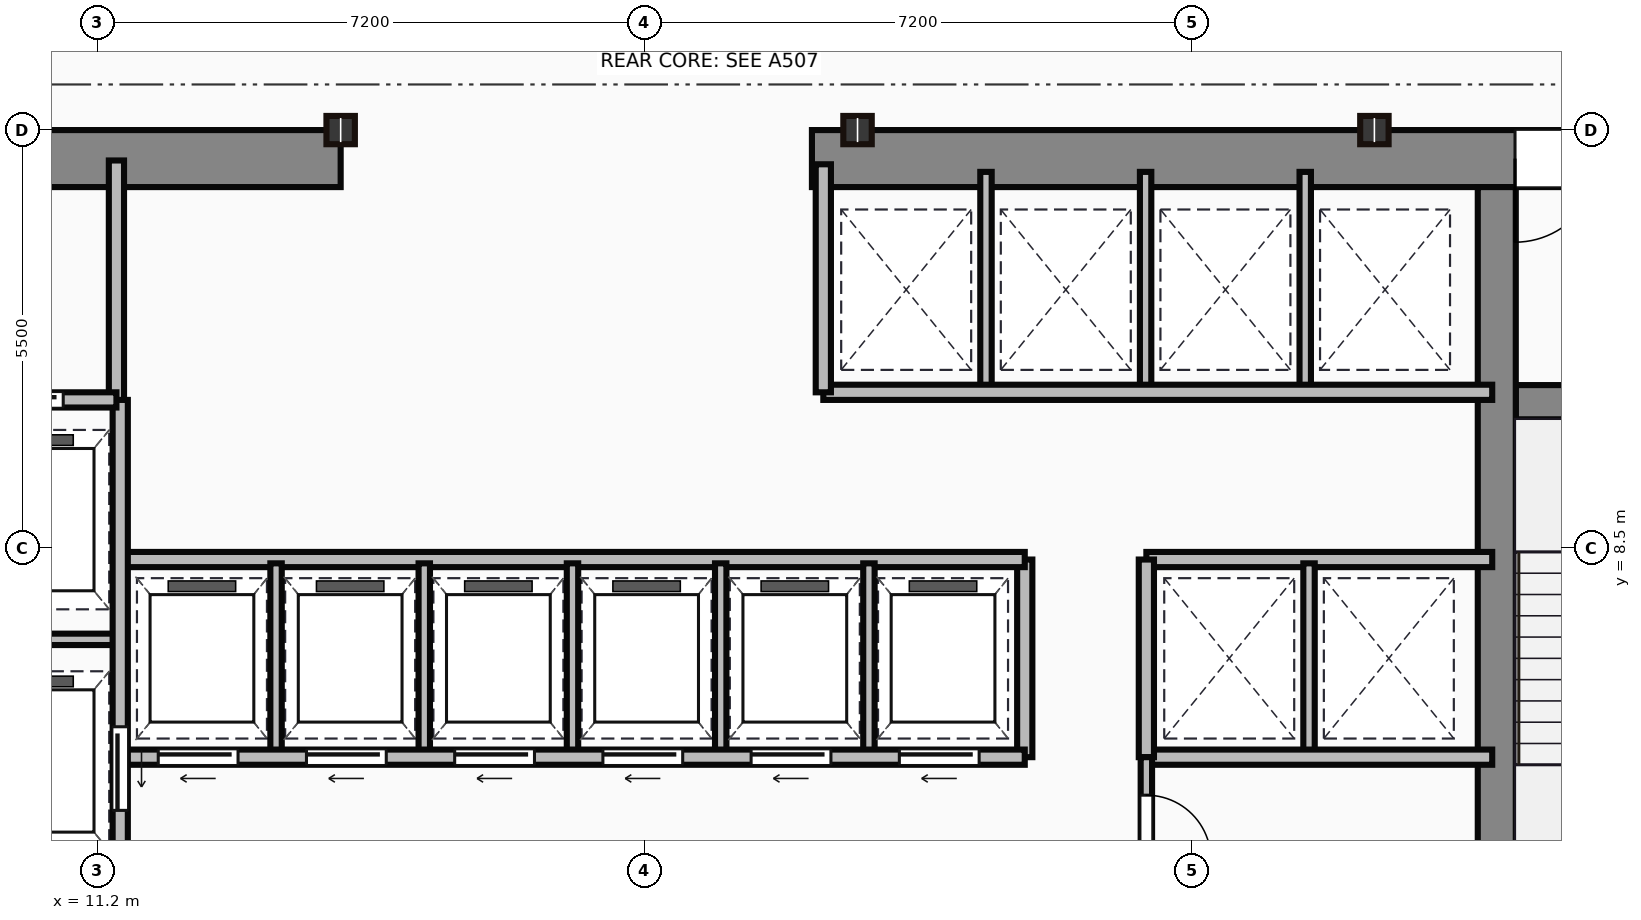
"""IFC4 building model, lengths in metres.
Left out: names, types, materials, properties, quantities, classifications, styles, units other than length and angle.
Written with IfcOpenShell. Run it as: python <this file> out.ifc"""

import sys

from ifc_helpers import new_model, si_unit, direction, frame, frame_2d, origin, origin_2d, place, context, subcontext, project, spatial, rectangle, i_section, extrude, source, transform, mapped, element, fill, save


model = new_model("IFC4")
c1 = context("Model", 3, precision=1e-05, world=origin(), true_north=direction((0.0, 1.0)))
c2 = subcontext(c1, "Body", "Model", "MODEL_VIEW")
j1 = project(units=[si_unit("LENGTHUNIT", "METRE"), si_unit("PLANEANGLEUNIT", "RADIAN")], contexts=[c1])
p1 = place(None, origin())
s1 = spatial("IfcSite", under=j1, at=p1, CompositionType="ELEMENT")
p2 = place(p1, origin())
s2 = spatial("IfcBuilding", under=s1, at=p2, CompositionType="ELEMENT")
p3 = place(p2, frame((0.0, 0.0, 166.15)))
s3 = spatial("IfcBuildingStorey", under=s2, at=p3, CompositionType="ELEMENT", Elevation=166.15)
m1 = source(origin(), c2, "Body", "SweptSolid", [
    extrude(rectangle(XDim=9.1, YDim=0.75, at=frame_2d((4.55, 0.0))), origin(), (0.0, 0.0, 1.0), 3.65),
])
p4 = place(p3, frame((5.3, 13.625, 0.0), z_axis=(0.0, 0.0, 1.0), x_axis=(1.0, 0.0, 0.0)))
e1 = element("IfcWall", 1, at=p4, inside=s3, PredefinedType="SHEAR", context=c2, shape_type="MappedRepresentation", body=[
    mapped(m1, transform((0.0, 0.0, 0.0))),
])
p5 = place(p4, frame((4.1, 0.0, 0.0)))
e2 = element("IfcOpeningElement", 2, at=p5, cuts=e1, PredefinedType="OPENING", context=c2, shape_type="SweptSolid", body=[
    extrude(rectangle(XDim=1.1, YDim=2.15, at=frame_2d((0.55, 1.075))), frame((0.0, 0.385, 0.0), z_axis=(0.0, -1.0, 0.0), x_axis=(1.0, 0.0, 0.0)), (0.0, 0.0, 1.0), 0.77),
])
m2 = source(origin(), c2, "Body", "SweptSolid", [
    extrude(rectangle(XDim=12.6, YDim=0.75, at=frame_2d((6.3, 0.0))), origin(), (0.0, 0.0, 1.0), 3.65),
])
p6 = place(p3, frame((20.6, 13.625, 0.0), z_axis=(0.0, 0.0, 1.0), x_axis=(1.0, 0.0, 0.0)))
e3 = element("IfcWall", 3, at=p6, inside=s3, PredefinedType="SHEAR", context=c2, shape_type="MappedRepresentation", body=[
    mapped(m2, transform((0.0, 0.0, 0.0))),
])
p7 = place(p6, frame((9.25, 0.0, 0.0)))
e4 = element("IfcOpeningElement", 4, at=p7, cuts=e3, PredefinedType="OPENING", context=c2, shape_type="SweptSolid", body=[
    extrude(rectangle(XDim=1.1, YDim=2.15, at=frame_2d((0.55, 1.075))), frame((0.0, 0.385, 0.0), z_axis=(0.0, -1.0, 0.0), x_axis=(1.0, 0.0, 0.0)), (0.0, 0.0, 1.0), 0.77),
])
m3 = source(origin(), c2, "Body", "SweptSolid", [
    extrude(rectangle(XDim=12.35, YDim=0.5, at=frame_2d((6.175, 0.0))), origin(), (0.0, 0.0, 1.0), 3.65),
])
p8 = place(p3, frame((29.61, 0.9, 0.0), z_axis=(0.0, 0.0, 1.0), x_axis=(0.0, 1.0, 0.0)))
e5 = element("IfcWall", 5, at=p8, inside=s3, PredefinedType="SHEAR", context=c2, shape_type="MappedRepresentation", body=[
    mapped(m3, transform((0.0, 0.0, 0.0))),
])
m4 = source(origin(), c2, "Body", "SweptSolid", [
    extrude(rectangle(XDim=3.39, YDim=0.45, at=frame_2d((1.695, 0.0))), origin(), (0.0, 0.0, 1.0), 3.65),
])
p9 = place(p3, frame((29.86, 10.42, 0.0), z_axis=(0.0, 0.0, 1.0), x_axis=(1.0, 0.0, 0.0)))
e6 = element("IfcWall", 6, at=p9, inside=s3, PredefinedType="SHEAR", context=c2, shape_type="MappedRepresentation", body=[
    mapped(m4, transform((0.0, 0.0, 0.0))),
])
p10 = place(p9, frame((1.1, 0.0, 0.0)))
e7 = element("IfcOpeningElement", 7, at=p10, cuts=e6, PredefinedType="OPENING", context=c2, shape_type="SweptSolid", body=[
    extrude(rectangle(XDim=1.1, YDim=2.15, at=frame_2d((0.55, 1.075))), frame((0.0, 0.235, 0.0), z_axis=(0.0, -1.0, 0.0), x_axis=(1.0, 0.0, 0.0)), (0.0, 0.0, 1.0), 0.47),
])
m5 = source(origin(), c2, "Body", "SweptSolid", [
    extrude(i_section(OverallWidth=0.374, OverallDepth=0.372, WebThickness=0.016, FlangeThickness=0.026, at=origin_2d()), origin(), (0.0, 0.0, 1.0), 3.65),
])
for number, where, z_axis, x_axis in (
    (8, (14.4, 14.0, 0.0), (0.0, 0.0, 1.0), (1.0, 0.0, 0.0)),
    (9, (21.2, 14.0, 0.0), (0.0, 0.0, 1.0), (1.0, 0.0, 0.0)),
    (10, (28.0, 14.0, 0.0), (0.0, 0.0, 1.0), (1.0, 0.0, 0.0)),
):
    element("IfcColumn", number, at=place(p3, frame(where, z_axis=z_axis, x_axis=x_axis)), inside=s3, PredefinedType="COLUMN", context=c2, shape_type="MappedRepresentation", body=[
        mapped(m5, transform((0.0, 0.0, 0.0))),
    ])
m6 = source(origin(), c2, "Body", "SweptSolid", [
    extrude(rectangle(XDim=3.18, YDim=0.2, at=frame_2d((1.59, 0.0))), origin(), (0.0, 0.0, 1.0), 3.4),
])
p11 = place(p3, frame((11.45, 10.42, 0.0), z_axis=(0.0, 0.0, 1.0), x_axis=(0.0, 1.0, 0.0)))
e11 = element("IfcWall", 11, at=p11, inside=s3, PredefinedType="PARTITIONING", context=c2, shape_type="MappedRepresentation", body=[
    mapped(m6, transform((0.0, 0.0, 0.0))),
])
m7 = source(origin(), c2, "Body", "SweptSolid", [
    extrude(rectangle(XDim=2.35, YDim=0.2, at=frame_2d((1.175, 0.0))), origin(), (0.0, 0.0, 1.0), 3.4),
])
p12 = place(p3, frame((9.1, 10.45, 0.0), z_axis=(0.0, 0.0, 1.0), x_axis=(1.0, 0.0, 0.0)))
e12 = element("IfcWall", 12, at=p12, inside=s3, PredefinedType="PARTITIONING", context=c2, shape_type="MappedRepresentation", body=[
    mapped(m7, transform((0.0, 0.0, 0.0))),
])
p13 = place(p12, frame((0.55, 0.0, 0.0)))
e13 = element("IfcOpeningElement", 13, at=p13, cuts=e12, PredefinedType="OPENING", context=c2, shape_type="SweptSolid", body=[
    extrude(rectangle(XDim=1.1, YDim=2.15, at=frame_2d((0.55, 1.075))), frame((0.0, 0.11, 0.0), z_axis=(0.0, -1.0, 0.0), x_axis=(1.0, 0.0, 0.0)), (0.0, 0.0, 1.0), 0.22),
])
m8 = source(origin(), c2, "Body", "SweptSolid", [
    extrude(rectangle(XDim=9.6, YDim=0.2, at=frame_2d((4.8, 0.0))), origin(), (0.0, 0.0, 1.0), 3.4),
])
p14 = place(p3, frame((11.5, 0.85, 0.0), z_axis=(0.0, 0.0, 1.0), x_axis=(0.0, 1.0, 0.0)))
e14 = element("IfcWall", 14, at=p14, inside=s3, PredefinedType="PARTITIONING", context=c2, shape_type="MappedRepresentation", body=[
    mapped(m8, transform((0.0, 0.0, 0.0))),
])
p15 = place(p14, frame((4.2, 0.0, 0.0)))
e15 = element("IfcOpeningElement", 15, at=p15, cuts=e14, PredefinedType="OPENING", context=c2, shape_type="SweptSolid", body=[
    extrude(rectangle(XDim=1.1, YDim=2.15, at=frame_2d((0.55, 1.075))), frame((0.0, 0.11, 0.0), z_axis=(0.0, -1.0, 0.0), x_axis=(1.0, 0.0, 0.0)), (0.0, 0.0, 1.0), 0.22),
])
p16 = place(p14, frame((0.9, 0.0, 0.0)))
e16 = element("IfcOpeningElement", 16, at=p16, cuts=e14, PredefinedType="OPENING", context=c2, shape_type="SweptSolid", body=[
    extrude(rectangle(XDim=1.2, YDim=2.15, at=frame_2d((0.6, 1.075))), frame((0.0, 0.11, 0.0), z_axis=(0.0, -1.0, 0.0), x_axis=(1.0, 0.0, 0.0)), (0.0, 0.0, 1.0), 0.22),
])
m9 = source(origin(), c2, "Body", "SweptSolid", [
    extrude(rectangle(XDim=2.4, YDim=0.15, at=frame_2d((1.2, 0.0))), origin(), (0.0, 0.0, 1.0), 3.4),
])
p17 = place(p3, frame((9.1, 7.3, 0.0), z_axis=(0.0, 0.0, 1.0), x_axis=(1.0, 0.0, 0.0)))
e17 = element("IfcWall", 17, at=p17, inside=s3, PredefinedType="PARTITIONING", context=c2, shape_type="MappedRepresentation", body=[
    mapped(m9, transform((0.0, 0.0, 0.0))),
])
m10 = source(origin(), c2, "Body", "SweptSolid", [
    extrude(rectangle(XDim=11.85, YDim=0.2, at=frame_2d((5.925, 0.0))), origin(), (0.0, 0.0, 1.0), 3.4),
])
p18 = place(p3, frame((11.55, 5.75, 0.0), z_axis=(0.0, 0.0, 1.0), x_axis=(1.0, 0.0, 0.0)))
e18 = element("IfcWall", 18, at=p18, inside=s3, PredefinedType="PARTITIONING", context=c2, shape_type="MappedRepresentation", body=[
    mapped(m10, transform((0.0, 0.0, 0.0))),
])
p19 = place(p18, frame((0.45, 0.0, 0.0)))
e19 = element("IfcOpeningElement", 19, at=p19, cuts=e18, PredefinedType="OPENING", context=c2, shape_type="SweptSolid", body=[
    extrude(rectangle(XDim=1.05, YDim=2.15, at=frame_2d((0.525, 1.075))), frame((0.0, 0.11, 0.0), z_axis=(0.0, -1.0, 0.0), x_axis=(1.0, 0.0, 0.0)), (0.0, 0.0, 1.0), 0.22),
])
p20 = place(p18, frame((2.4, 0.0, 0.0)))
e20 = element("IfcOpeningElement", 20, at=p20, cuts=e18, PredefinedType="OPENING", context=c2, shape_type="SweptSolid", body=[
    extrude(rectangle(XDim=1.05, YDim=2.15, at=frame_2d((0.525, 1.075))), frame((0.0, 0.11, 0.0), z_axis=(0.0, -1.0, 0.0), x_axis=(1.0, 0.0, 0.0)), (0.0, 0.0, 1.0), 0.22),
])
p21 = place(p18, frame((4.35, 0.0, 0.0)))
e21 = element("IfcOpeningElement", 21, at=p21, cuts=e18, PredefinedType="OPENING", context=c2, shape_type="SweptSolid", body=[
    extrude(rectangle(XDim=1.05, YDim=2.15, at=frame_2d((0.525, 1.075))), frame((0.0, 0.11, 0.0), z_axis=(0.0, -1.0, 0.0), x_axis=(1.0, 0.0, 0.0)), (0.0, 0.0, 1.0), 0.22),
])
p22 = place(p18, frame((6.3, 0.0, 0.0)))
e22 = element("IfcOpeningElement", 22, at=p22, cuts=e18, PredefinedType="OPENING", context=c2, shape_type="SweptSolid", body=[
    extrude(rectangle(XDim=1.05, YDim=2.15, at=frame_2d((0.525, 1.075))), frame((0.0, 0.11, 0.0), z_axis=(0.0, -1.0, 0.0), x_axis=(1.0, 0.0, 0.0)), (0.0, 0.0, 1.0), 0.22),
])
p23 = place(p18, frame((8.25, 0.0, 0.0)))
e23 = element("IfcOpeningElement", 23, at=p23, cuts=e18, PredefinedType="OPENING", context=c2, shape_type="SweptSolid", body=[
    extrude(rectangle(XDim=1.05, YDim=2.15, at=frame_2d((0.525, 1.075))), frame((0.0, 0.11, 0.0), z_axis=(0.0, -1.0, 0.0), x_axis=(1.0, 0.0, 0.0)), (0.0, 0.0, 1.0), 0.22),
])
p24 = place(p18, frame((10.2, 0.0, 0.0)))
e24 = element("IfcOpeningElement", 24, at=p24, cuts=e18, PredefinedType="OPENING", context=c2, shape_type="SweptSolid", body=[
    extrude(rectangle(XDim=1.05, YDim=2.15, at=frame_2d((0.525, 1.075))), frame((0.0, 0.11, 0.0), z_axis=(0.0, -1.0, 0.0), x_axis=(1.0, 0.0, 0.0)), (0.0, 0.0, 1.0), 0.22),
])
p25 = place(p3, frame((11.55, 8.35, 0.0), z_axis=(0.0, 0.0, 1.0), x_axis=(1.0, 0.0, 0.0)))
e25 = element("IfcWall", 25, at=p25, inside=s3, PredefinedType="PARTITIONING", context=c2, shape_type="MappedRepresentation", body=[
    mapped(m10, transform((0.0, 0.0, 0.0))),
])
m11 = source(origin(), c2, "Body", "SweptSolid", [
    extrude(rectangle(XDim=2.6, YDim=0.2, at=frame_2d((1.3, 0.0))), origin(), (0.0, 0.0, 1.0), 3.4),
])
p26 = place(p3, frame((23.4, 5.75, 0.0), z_axis=(0.0, 0.0, 1.0), x_axis=(0.0, 1.0, 0.0)))
e26 = element("IfcWall", 26, at=p26, inside=s3, PredefinedType="PARTITIONING", context=c2, shape_type="MappedRepresentation", body=[
    mapped(m11, transform((0.0, 0.0, 0.0))),
])
m12 = source(origin(), c2, "Body", "SweptSolid", [
    extrude(rectangle(XDim=2.5, YDim=0.15, at=frame_2d((1.25, 0.0))), origin(), (0.0, 0.0, 1.0), 3.4),
])
for number, where, z_axis, x_axis in (
    (27, (13.55, 5.8, 0.0), (0.0, 0.0, 1.0), (0.0, 1.0, 0.0)),
    (28, (15.5, 5.8, 0.0), (0.0, 0.0, 1.0), (0.0, 1.0, 0.0)),
    (29, (17.45, 5.8, 0.0), (0.0, 0.0, 1.0), (0.0, 1.0, 0.0)),
    (30, (19.4, 5.8, 0.0), (0.0, 0.0, 1.0), (0.0, 1.0, 0.0)),
    (31, (21.35, 5.8, 0.0), (0.0, 0.0, 1.0), (0.0, 1.0, 0.0)),
):
    element("IfcWall", number, at=place(p3, frame(where, z_axis=z_axis, x_axis=x_axis)), inside=s3, PredefinedType="PARTITIONING", context=c2, shape_type="MappedRepresentation", body=[
        mapped(m12, transform((0.0, 0.0, 0.0))),
    ])
m13 = source(origin(), c2, "Body", "SweptSolid", [
    extrude(rectangle(XDim=8.8, YDim=0.2, at=frame_2d((4.4, 0.0))), origin(), (0.0, 0.0, 1.0), 3.4),
])
p27 = place(p3, frame((20.75, 10.55, 0.0), z_axis=(0.0, 0.0, 1.0), x_axis=(1.0, 0.0, 0.0)))
e32 = element("IfcWall", 32, at=p27, inside=s3, PredefinedType="PARTITIONING", context=c2, shape_type="MappedRepresentation", body=[
    mapped(m13, transform((0.0, 0.0, 0.0))),
])
m14 = source(origin(), c2, "Body", "SweptSolid", [
    extrude(rectangle(XDim=3.0, YDim=0.2, at=frame_2d((1.5, 0.0))), origin(), (0.0, 0.0, 1.0), 3.4),
])
p28 = place(p3, frame((20.75, 10.55, 0.0), z_axis=(0.0, 0.0, 1.0), x_axis=(0.0, 1.0, 0.0)))
e33 = element("IfcWall", 33, at=p28, inside=s3, PredefinedType="PARTITIONING", context=c2, shape_type="MappedRepresentation", body=[
    mapped(m14, transform((0.0, 0.0, 0.0))),
])
m15 = source(origin(), c2, "Body", "SweptSolid", [
    extrude(rectangle(XDim=2.85, YDim=0.15, at=frame_2d((1.425, 0.0))), origin(), (0.0, 0.0, 1.0), 3.4),
])
for number, where, z_axis, x_axis in (
    (34, (22.89, 10.6, 0.0), (0.0, 0.0, 1.0), (0.0, 1.0, 0.0)),
    (35, (24.99, 10.6, 0.0), (0.0, 0.0, 1.0), (0.0, 1.0, 0.0)),
    (36, (27.09, 10.6, 0.0), (0.0, 0.0, 1.0), (0.0, 1.0, 0.0)),
):
    element("IfcWall", number, at=place(p3, frame(where, z_axis=z_axis, x_axis=x_axis)), inside=s3, PredefinedType="PARTITIONING", context=c2, shape_type="MappedRepresentation", body=[
        mapped(m15, transform((0.0, 0.0, 0.0))),
    ])
m16 = source(origin(), c2, "Body", "SweptSolid", [
    extrude(rectangle(XDim=4.55, YDim=0.2, at=frame_2d((2.275, 0.0))), origin(), (0.0, 0.0, 1.0), 3.4),
])
for number, where, z_axis, x_axis in (
    (37, (25.0, 8.35, 0.0), (0.0, 0.0, 1.0), (1.0, 0.0, 0.0)),
    (38, (25.0, 5.75, 0.0), (0.0, 0.0, 1.0), (1.0, 0.0, 0.0)),
):
    element("IfcWall", number, at=place(p3, frame(where, z_axis=z_axis, x_axis=x_axis)), inside=s3, PredefinedType="PARTITIONING", context=c2, shape_type="MappedRepresentation", body=[
        mapped(m16, transform((0.0, 0.0, 0.0))),
    ])
p29 = place(p3, frame((25.0, 5.75, 0.0), z_axis=(0.0, 0.0, 1.0), x_axis=(0.0, 1.0, 0.0)))
e39 = element("IfcWall", 39, at=p29, inside=s3, PredefinedType="PARTITIONING", context=c2, shape_type="MappedRepresentation", body=[
    mapped(m11, transform((0.0, 0.0, 0.0))),
])
p30 = place(p3, frame((27.14, 5.8, 0.0), z_axis=(0.0, 0.0, 1.0), x_axis=(0.0, 1.0, 0.0)))
e40 = element("IfcWall", 40, at=p30, inside=s3, PredefinedType="PARTITIONING", context=c2, shape_type="MappedRepresentation", body=[
    mapped(m12, transform((0.0, 0.0, 0.0))),
])
m17 = source(origin(), c2, "Body", "SweptSolid", [
    extrude(rectangle(XDim=4.9, YDim=0.15, at=frame_2d((2.45, 0.0))), origin(), (0.0, 0.0, 1.0), 3.4),
])
p31 = place(p3, frame((25.0, 0.85, 0.0), z_axis=(0.0, 0.0, 1.0), x_axis=(0.0, 1.0, 0.0)))
e41 = element("IfcWall", 41, at=p31, inside=s3, PredefinedType="PARTITIONING", context=c2, shape_type="MappedRepresentation", body=[
    mapped(m17, transform((0.0, 0.0, 0.0))),
])
p32 = place(p31, frame((1.85, 0.0, 0.0)))
e42 = element("IfcOpeningElement", 42, at=p32, cuts=e41, PredefinedType="OPENING", context=c2, shape_type="SweptSolid", body=[
    extrude(rectangle(XDim=0.95, YDim=2.15, at=frame_2d((0.475, 1.075))), frame((0.0, 0.085, 0.0), z_axis=(0.0, -1.0, 0.0), x_axis=(1.0, 0.0, 0.0)), (0.0, 0.0, 1.0), 0.17),
])
p33 = place(p31, frame((3.55, 0.0, 0.0)))
e43 = element("IfcOpeningElement", 43, at=p33, cuts=e41, PredefinedType="OPENING", context=c2, shape_type="SweptSolid", body=[
    extrude(rectangle(XDim=0.85, YDim=2.15, at=frame_2d((0.425, 1.075))), frame((0.0, 0.085, 0.0), z_axis=(0.0, -1.0, 0.0), x_axis=(1.0, 0.0, 0.0)), (0.0, 0.0, 1.0), 0.17),
])
m18 = source(origin(), c2, "Body", "SweptSolid", [
    extrude(rectangle(XDim=1.1, YDim=2.15, at=frame_2d((0.55, 1.075))), frame((0.0, 0.025, 0.0), z_axis=(0.0, -1.0, 0.0), x_axis=(1.0, 0.0, 0.0)), (0.0, 0.0, 1.0), 0.05),
])
p34 = place(p7, origin())
e44 = element("IfcDoor", 44, at=p34, inside=s3, OperationType="SINGLE_SWING_LEFT", PredefinedType="DOOR", context=c2, shape_type="MappedRepresentation", body=[
    mapped(m18, transform((0.0, 0.0, 0.0))),
])
fill(e4, e44)
p35 = place(p13, origin())
e45 = element("IfcDoor", 45, at=p35, inside=s3, OperationType="SLIDING_TO_LEFT", PredefinedType="DOOR", context=c2, shape_type="MappedRepresentation", body=[
    mapped(m18, transform((0.0, 0.0, 0.0))),
])
fill(e13, e45)
p36 = place(p15, frame((1.1, 0.0, 0.0), z_axis=(0.0, 0.0, 1.0), x_axis=(-1.0, 0.0, 0.0)))
e46 = element("IfcDoor", 46, at=p36, inside=s3, OperationType="SLIDING_TO_LEFT", PredefinedType="DOOR", context=c2, shape_type="MappedRepresentation", body=[
    mapped(m18, transform((0.0, 0.0, 0.0))),
])
fill(e15, e46)
m19 = source(origin(), c2, "Body", "SweptSolid", [
    extrude(rectangle(XDim=1.05, YDim=2.15, at=frame_2d((0.525, 1.075))), frame((0.0, 0.025, 0.0), z_axis=(0.0, -1.0, 0.0), x_axis=(1.0, 0.0, 0.0)), (0.0, 0.0, 1.0), 0.05),
])
p37 = place(p19, frame((1.05, 0.0, 0.0), z_axis=(0.0, 0.0, 1.0), x_axis=(-1.0, 0.0, 0.0)))
e47 = element("IfcDoor", 47, at=p37, inside=s3, OperationType="SLIDING_TO_LEFT", PredefinedType="DOOR", context=c2, shape_type="MappedRepresentation", body=[
    mapped(m19, transform((0.0, 0.0, 0.0))),
])
fill(e19, e47)
p38 = place(p20, frame((1.05, 0.0, 0.0), z_axis=(0.0, 0.0, 1.0), x_axis=(-1.0, 0.0, 0.0)))
e48 = element("IfcDoor", 48, at=p38, inside=s3, OperationType="SLIDING_TO_LEFT", PredefinedType="DOOR", context=c2, shape_type="MappedRepresentation", body=[
    mapped(m19, transform((0.0, 0.0, 0.0))),
])
fill(e20, e48)
p39 = place(p21, frame((1.05, 0.0, 0.0), z_axis=(0.0, 0.0, 1.0), x_axis=(-1.0, 0.0, 0.0)))
e49 = element("IfcDoor", 49, at=p39, inside=s3, OperationType="SLIDING_TO_LEFT", PredefinedType="DOOR", context=c2, shape_type="MappedRepresentation", body=[
    mapped(m19, transform((0.0, 0.0, 0.0))),
])
fill(e21, e49)
p40 = place(p22, frame((1.05, 0.0, 0.0), z_axis=(0.0, 0.0, 1.0), x_axis=(-1.0, 0.0, 0.0)))
e50 = element("IfcDoor", 50, at=p40, inside=s3, OperationType="SLIDING_TO_LEFT", PredefinedType="DOOR", context=c2, shape_type="MappedRepresentation", body=[
    mapped(m19, transform((0.0, 0.0, 0.0))),
])
fill(e22, e50)
p41 = place(p23, frame((1.05, 0.0, 0.0), z_axis=(0.0, 0.0, 1.0), x_axis=(-1.0, 0.0, 0.0)))
e51 = element("IfcDoor", 51, at=p41, inside=s3, OperationType="SLIDING_TO_LEFT", PredefinedType="DOOR", context=c2, shape_type="MappedRepresentation", body=[
    mapped(m19, transform((0.0, 0.0, 0.0))),
])
fill(e23, e51)
p42 = place(p24, frame((1.05, 0.0, 0.0), z_axis=(0.0, 0.0, 1.0), x_axis=(-1.0, 0.0, 0.0)))
e52 = element("IfcDoor", 52, at=p42, inside=s3, OperationType="SLIDING_TO_LEFT", PredefinedType="DOOR", context=c2, shape_type="MappedRepresentation", body=[
    mapped(m19, transform((0.0, 0.0, 0.0))),
])
fill(e24, e52)
m20 = source(origin(), c2, "Body", "SweptSolid", [
    extrude(rectangle(XDim=0.85, YDim=2.15, at=frame_2d((0.425, 1.075))), frame((0.0, 0.025, 0.0), z_axis=(0.0, -1.0, 0.0), x_axis=(1.0, 0.0, 0.0)), (0.0, 0.0, 1.0), 0.05),
])
p43 = place(p33, origin())
e53 = element("IfcDoor", 53, at=p43, inside=s3, OperationType="SINGLE_SWING_LEFT", PredefinedType="DOOR", context=c2, shape_type="MappedRepresentation", body=[
    mapped(m20, transform((0.0, 0.0, 0.0))),
])
fill(e43, e53)
save(model, sys.argv[1])
